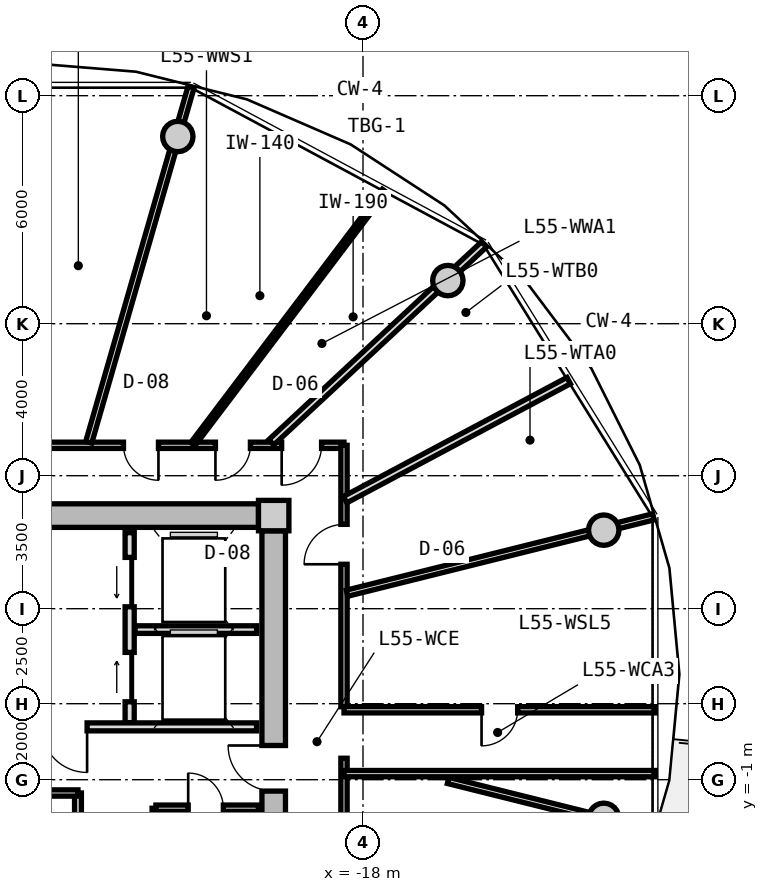
"""IFC4 building model, lengths in metres.
Left out: names, types, materials, properties, quantities, classifications, styles, units other than length and angle.
Written with IfcOpenShell. Run it as: python <this file> out.ifc"""

import sys

from ifc_helpers import new_model, si_unit, direction, frame, frame_2d, origin, origin_2d, place, context, subcontext, project, spatial, rectangle, circle, extrude, source, transform, mapped, element, fill, save


model = new_model("IFC4")
c1 = context("Model", 3, precision=1e-05, world=origin(), true_north=direction((0.0, 1.0)))
c2 = subcontext(c1, "Body", "Model", "MODEL_VIEW")
j1 = project(units=[si_unit("LENGTHUNIT", "METRE"), si_unit("PLANEANGLEUNIT", "RADIAN")], contexts=[c1])
p1 = place(None, origin())
s1 = spatial("IfcSite", under=j1, at=p1, CompositionType="ELEMENT")
p2 = place(p1, origin())
s2 = spatial("IfcBuilding", under=s1, at=p2, CompositionType="ELEMENT")
p3 = place(p2, frame((0.0, 0.0, 177.0)))
s3 = spatial("IfcBuildingStorey", under=s2, at=p3, CompositionType="ELEMENT", Elevation=177.0)
m1 = source(origin(), c2, "Body", "SweptSolid", [
    extrude(rectangle(XDim=0.8, YDim=0.8, at=origin_2d()), origin(), (0.0, 0.0, 1.0), 3.05),
])
p4 = place(p3, frame((-20.35, 5.95, 0.0), z_axis=(0.0, 0.0, 1.0), x_axis=(1.0, 0.0, 0.0)))
e1 = element("IfcColumn", 1, at=p4, inside=s3, PredefinedType="COLUMN", context=c2, shape_type="MappedRepresentation", body=[
    mapped(m1, transform((0.0, 0.0, 0.0), x_axis=(1.0, 0.0, 0.0), y_axis=(0.0, 1.0, 0.0), z_axis=(0.0, 0.0, 1.0), scale=1.0)),
])
m2 = source(origin(), c2, "Body", "SweptSolid", [
    extrude(rectangle(XDim=14.5, YDim=0.62, at=frame_2d((7.25, 0.0))), origin(), (0.0, 0.0, 1.0), 2.81),
])
p5 = place(p3, frame((-35.25, 5.95, 0.0), z_axis=(0.0, 0.0, 1.0), x_axis=(1.0, 0.0, 0.0)))
e2 = element("IfcWall", 2, at=p5, inside=s3, PredefinedType="SHEAR", context=c2, shape_type="MappedRepresentation", body=[
    mapped(m2, transform((0.0, 0.0, 0.0), x_axis=(1.0, 0.0, 0.0), y_axis=(0.0, 1.0, 0.0), z_axis=(0.0, 0.0, 1.0), scale=1.0)),
])
m3 = source(origin(), c2, "Body", "SweptSolid", [
    extrude(rectangle(XDim=11.1, YDim=0.62, at=frame_2d((5.55, 0.0))), origin(), (0.0, 0.0, 1.0), 2.81),
])
p6 = place(p3, frame((-20.35, 5.55, 0.0), z_axis=(0.0, 0.0, 1.0), x_axis=(0.0, -1.0, 0.0)))
e3 = element("IfcWall", 3, at=p6, inside=s3, PredefinedType="SHEAR", context=c2, shape_type="MappedRepresentation", body=[
    mapped(m3, transform((0.0, 0.0, 0.0), x_axis=(1.0, 0.0, 0.0), y_axis=(0.0, 1.0, 0.0), z_axis=(0.0, 0.0, 1.0), scale=1.0)),
])
p7 = place(p6, frame((5.65, 0.0, 0.0)))
e4 = element("IfcOpeningElement", 4, at=p7, cuts=e3, PredefinedType="OPENING", context=c2, shape_type="SweptSolid", body=[
    extrude(rectangle(XDim=1.2, YDim=2.15, at=frame_2d((0.6, 1.075))), frame((0.0, 0.32, 0.0), z_axis=(0.0, -1.0, 0.0), x_axis=(1.0, 0.0, 0.0)), (0.0, 0.0, 1.0), 0.64),
])
m4 = source(origin(), c2, "Body", "SweptSolid", [
    extrude(circle(Radius=0.4, at=origin_2d()), origin(), (0.0, 0.0, 1.0), 3.05),
])
for number, where, z_axis, x_axis in (
    (5, (-11.665, 5.567, 0.0), (0.0, 0.0, 1.0), (1.0, 0.0, 0.0)),
    (6, (-15.767, 12.135, 0.0), (0.0, 0.0, 1.0), (1.0, 0.0, 0.0)),
    (7, (-22.873, 15.926, 0.0), (0.0, 0.0, 1.0), (1.0, 0.0, 0.0)),
    (8, (-11.665, -2.016, 0.0), (0.0, 0.0, 1.0), (1.0, 0.0, 0.0)),
):
    element("IfcColumn", number, at=place(p3, frame(where, z_axis=z_axis, x_axis=x_axis)), inside=s3, PredefinedType="COLUMN", context=c2, shape_type="MappedRepresentation", body=[
        mapped(m4, transform((0.0, 0.0, 0.0), x_axis=(1.0, 0.0, 0.0), y_axis=(0.0, 1.0, 0.0), z_axis=(0.0, 0.0, 1.0), scale=1.0)),
    ])
m5 = source(origin(), c2, "Body", "SweptSolid", [
    extrude(rectangle(XDim=5.0, YDim=0.24, at=frame_2d((2.5, 0.0))), origin(), (0.0, 0.0, 1.0), 2.795),
])
p8 = place(p3, frame((-24.14, 0.5, 0.0), z_axis=(0.0, 0.0, 1.0), x_axis=(0.0, 1.0, 0.0)))
e9 = element("IfcWall", 9, at=p8, inside=s3, PredefinedType="PARTITIONING", context=c2, shape_type="MappedRepresentation", body=[
    mapped(m5, transform((0.0, 0.0, 0.0), x_axis=(1.0, 0.0, 0.0), y_axis=(0.0, 1.0, 0.0), z_axis=(0.0, 0.0, 1.0), scale=1.0)),
])
p9 = place(p8, frame((3.05, 0.0, 0.0)))
e10 = element("IfcOpeningElement", 10, at=p9, cuts=e9, PredefinedType="OPENING", context=c2, shape_type="SweptSolid", body=[
    extrude(rectangle(XDim=1.3, YDim=2.2, at=frame_2d((0.65, 1.1))), frame((0.0, 0.13, 0.0), z_axis=(0.0, -1.0, 0.0), x_axis=(1.0, 0.0, 0.0)), (0.0, 0.0, 1.0), 0.26),
])
p10 = place(p8, frame((0.55, 0.0, 0.0)))
e11 = element("IfcOpeningElement", 11, at=p10, cuts=e9, PredefinedType="OPENING", context=c2, shape_type="SweptSolid", body=[
    extrude(rectangle(XDim=1.3, YDim=2.2, at=frame_2d((0.65, 1.1))), frame((0.0, 0.13, 0.0), z_axis=(0.0, -1.0, 0.0), x_axis=(1.0, 0.0, 0.0)), (0.0, 0.0, 1.0), 0.26),
])
m6 = source(origin(), c2, "Body", "SweptSolid", [
    extrude(rectangle(XDim=3.2, YDim=0.2, at=frame_2d((1.6, 0.0))), origin(), (0.0, 0.0, 1.0), 2.795),
])
p11 = place(p3, frame((-24.0, 2.95, 0.0), z_axis=(0.0, 0.0, 1.0), x_axis=(1.0, 0.0, 0.0)))
e12 = element("IfcWall", 12, at=p11, inside=s3, PredefinedType="PARTITIONING", context=c2, shape_type="MappedRepresentation", body=[
    mapped(m6, transform((0.0, 0.0, 0.0), x_axis=(1.0, 0.0, 0.0), y_axis=(0.0, 1.0, 0.0), z_axis=(0.0, 0.0, 1.0), scale=1.0)),
])
m7 = source(origin(), c2, "Body", "SweptSolid", [
    extrude(rectangle(XDim=6.66, YDim=0.21, at=frame_2d((3.33, 0.0))), origin(), (0.0, 0.0, 1.0), 2.795),
])
p12 = place(p3, frame((-27.46, 0.39, 0.0), z_axis=(0.0, 0.0, 1.0), x_axis=(1.0, 0.0, 0.0)))
e13 = element("IfcWall", 13, at=p12, inside=s3, PredefinedType="PARTITIONING", context=c2, shape_type="MappedRepresentation", body=[
    mapped(m7, transform((0.0, 0.0, 0.0), x_axis=(1.0, 0.0, 0.0), y_axis=(0.0, 1.0, 0.0), z_axis=(0.0, 0.0, 1.0), scale=1.0)),
])
p13 = place(p12, frame((1.0, 0.0, 0.0)))
e14 = element("IfcOpeningElement", 14, at=p13, cuts=e13, PredefinedType="OPENING", context=c2, shape_type="SweptSolid", body=[
    extrude(rectangle(XDim=1.2, YDim=2.15, at=frame_2d((0.6, 1.075))), frame((0.0, 0.115, 0.0), z_axis=(0.0, -1.0, 0.0), x_axis=(1.0, 0.0, 0.0)), (0.0, 0.0, 1.0), 0.23),
])
m8 = source(origin(), c2, "Body", "SweptSolid", [
    extrude(rectangle(XDim=3.8, YDim=0.2, at=frame_2d((1.9, 0.0))), origin(), (0.0, 0.0, 1.0), 2.795),
])
p14 = place(p3, frame((-23.45, -5.55, 0.0), z_axis=(0.0, 0.0, 1.0), x_axis=(0.0, 1.0, 0.0)))
e15 = element("IfcWall", 15, at=p14, inside=s3, PredefinedType="PARTITIONING", context=c2, shape_type="MappedRepresentation", body=[
    mapped(m8, transform((0.0, 0.0, 0.0), x_axis=(1.0, 0.0, 0.0), y_axis=(0.0, 1.0, 0.0), z_axis=(0.0, 0.0, 1.0), scale=1.0)),
])
m9 = source(origin(), c2, "Body", "SweptSolid", [
    extrude(rectangle(XDim=4.2, YDim=0.18, at=frame_2d((2.1, 0.0))), origin(), (0.0, 0.0, 1.0), 2.795),
])
p15 = place(p3, frame((-25.5, -5.55, 0.0), z_axis=(0.0, 0.0, 1.0), x_axis=(0.0, 1.0, 0.0)))
e16 = element("IfcWall", 16, at=p15, inside=s3, PredefinedType="PARTITIONING", context=c2, shape_type="MappedRepresentation", body=[
    mapped(m9, transform((0.0, 0.0, 0.0), x_axis=(1.0, 0.0, 0.0), y_axis=(0.0, 1.0, 0.0), z_axis=(0.0, 0.0, 1.0), scale=1.0)),
])
m10 = source(origin(), c2, "Body", "SweptSolid", [
    extrude(rectangle(XDim=4.77, YDim=0.165, at=frame_2d((2.385, 0.0))), origin(), (0.0, 0.0, 1.0), 2.795),
])
p16 = place(p3, frame((-30.27, -1.35, 0.0), z_axis=(0.0, 0.0, 1.0), x_axis=(1.0, 0.0, 0.0)))
e17 = element("IfcWall", 17, at=p16, inside=s3, PredefinedType="PARTITIONING", context=c2, shape_type="MappedRepresentation", body=[
    mapped(m10, transform((0.0, 0.0, 0.0), x_axis=(1.0, 0.0, 0.0), y_axis=(0.0, 1.0, 0.0), z_axis=(0.0, 0.0, 1.0), scale=1.0)),
])
p17 = place(p16, frame((1.85, 0.0, 0.0)))
e18 = element("IfcOpeningElement", 18, at=p17, cuts=e17, PredefinedType="OPENING", context=c2, shape_type="SweptSolid", body=[
    extrude(rectangle(XDim=1.0, YDim=2.1, at=frame_2d((0.5, 1.05))), frame((0.0, 0.093, 0.0), z_axis=(0.0, -1.0, 0.0), x_axis=(1.0, 0.0, 0.0)), (0.0, 0.0, 1.0), 0.185),
])
m11 = source(origin(), c2, "Body", "SweptSolid", [
    extrude(rectangle(XDim=2.7, YDim=0.165, at=frame_2d((1.35, 0.0))), origin(), (0.0, 0.0, 1.0), 2.795),
])
p18 = place(p3, frame((-23.45, -1.75, 0.0), z_axis=(0.0, 0.0, 1.0), x_axis=(1.0, 0.0, 0.0)))
e19 = element("IfcWall", 19, at=p18, inside=s3, PredefinedType="PARTITIONING", context=c2, shape_type="MappedRepresentation", body=[
    mapped(m11, transform((0.0, 0.0, 0.0), x_axis=(1.0, 0.0, 0.0), y_axis=(0.0, 1.0, 0.0), z_axis=(0.0, 0.0, 1.0), scale=1.0)),
])
p19 = place(p18, frame((0.85, 0.0, 0.0)))
e20 = element("IfcOpeningElement", 20, at=p19, cuts=e19, PredefinedType="OPENING", context=c2, shape_type="SweptSolid", body=[
    extrude(rectangle(XDim=0.925, YDim=2.1, at=frame_2d((0.462, 1.05))), frame((0.0, 0.093, 0.0), z_axis=(0.0, -1.0, 0.0), x_axis=(1.0, 0.0, 0.0)), (0.0, 0.0, 1.0), 0.185),
])
m12 = source(origin(), c2, "Body", "SweptSolid", [
    extrude(rectangle(XDim=8.58, YDim=0.165, at=frame_2d((4.29, 0.0))), origin(), (0.0, 0.0, 1.0), 2.795),
])
p20 = place(p3, frame((-27.08, 7.8, 0.0), z_axis=(0.0, 0.0, 1.0), x_axis=(1.0, 0.0, 0.0)))
e21 = element("IfcWall", 21, at=p20, inside=s3, PredefinedType="PARTITIONING", context=c2, shape_type="MappedRepresentation", body=[
    mapped(m12, transform((0.0, 0.0, 0.0), x_axis=(1.0, 0.0, 0.0), y_axis=(0.0, 1.0, 0.0), z_axis=(0.0, 0.0, 1.0), scale=1.0)),
])
p21 = place(p20, frame((6.94, 0.0, 0.0)))
e22 = element("IfcOpeningElement", 22, at=p21, cuts=e21, PredefinedType="OPENING", context=c2, shape_type="SweptSolid", body=[
    extrude(rectangle(XDim=1.05, YDim=2.15, at=frame_2d((0.525, 1.075))), frame((0.0, 0.093, 0.0), z_axis=(0.0, -1.0, 0.0), x_axis=(1.0, 0.0, 0.0)), (0.0, 0.0, 1.0), 0.185),
])
p22 = place(p20, frame((5.197, 0.0, 0.0)))
e23 = element("IfcOpeningElement", 23, at=p22, cuts=e21, PredefinedType="OPENING", context=c2, shape_type="SweptSolid", body=[
    extrude(rectangle(XDim=0.92, YDim=2.1, at=frame_2d((0.46, 1.05))), frame((0.0, 0.093, 0.0), z_axis=(0.0, -1.0, 0.0), x_axis=(1.0, 0.0, 0.0)), (0.0, 0.0, 1.0), 0.185),
])
p23 = place(p20, frame((2.778, 0.0, 0.0)))
e24 = element("IfcOpeningElement", 24, at=p23, cuts=e21, PredefinedType="OPENING", context=c2, shape_type="SweptSolid", body=[
    extrude(rectangle(XDim=0.92, YDim=2.1, at=frame_2d((0.46, 1.05))), frame((0.0, 0.093, 0.0), z_axis=(0.0, -1.0, 0.0), x_axis=(1.0, 0.0, 0.0)), (0.0, 0.0, 1.0), 0.185),
])
m13 = source(origin(), c2, "Body", "SweptSolid", [
    extrude(rectangle(XDim=6.88, YDim=0.165, at=frame_2d((3.44, 0.0))), origin(), (0.0, 0.0, 1.0), 2.795),
])
p24 = place(p3, frame((-18.5, 7.8, 0.0), z_axis=(0.0, 0.0, 1.0), x_axis=(0.0, -1.0, 0.0)))
e25 = element("IfcWall", 25, at=p24, inside=s3, PredefinedType="PARTITIONING", context=c2, shape_type="MappedRepresentation", body=[
    mapped(m13, transform((0.0, 0.0, 0.0), x_axis=(1.0, 0.0, 0.0), y_axis=(0.0, 1.0, 0.0), z_axis=(0.0, 0.0, 1.0), scale=1.0)),
])
p25 = place(p24, frame((2.081, 0.0, 0.0)))
e26 = element("IfcOpeningElement", 26, at=p25, cuts=e25, PredefinedType="OPENING", context=c2, shape_type="SweptSolid", body=[
    extrude(rectangle(XDim=1.05, YDim=2.15, at=frame_2d((0.525, 1.075))), frame((0.0, 0.093, 0.0), z_axis=(0.0, -1.0, 0.0), x_axis=(1.0, 0.0, 0.0)), (0.0, 0.0, 1.0), 0.185),
])
m14 = source(origin(), c2, "Body", "SweptSolid", [
    extrude(rectangle(XDim=7.365, YDim=0.165, at=frame_2d((3.682, 0.0))), origin(), (0.0, 0.0, 1.0), 2.795),
])
p26 = place(p3, frame((-18.5, -0.436, 0.0), z_axis=(0.0, 0.0, 1.0), x_axis=(0.0, -1.0, 0.0)))
e27 = element("IfcWall", 27, at=p26, inside=s3, PredefinedType="PARTITIONING", context=c2, shape_type="MappedRepresentation", body=[
    mapped(m14, transform((0.0, 0.0, 0.0), x_axis=(1.0, 0.0, 0.0), y_axis=(0.0, 1.0, 0.0), z_axis=(0.0, 0.0, 1.0), scale=1.0)),
])
p27 = place(p26, frame((2.433, 0.0, 0.0)))
e28 = element("IfcOpeningElement", 28, at=p27, cuts=e27, PredefinedType="OPENING", context=c2, shape_type="SweptSolid", body=[
    extrude(rectangle(XDim=1.25, YDim=2.2, at=frame_2d((0.625, 1.1))), frame((0.0, 0.093, 0.0), z_axis=(0.0, -1.0, 0.0), x_axis=(1.0, 0.0, 0.0)), (0.0, 0.0, 1.0), 0.185),
])
m15 = source(origin(), c2, "Body", "SweptSolid", [
    extrude(rectangle(XDim=9.73, YDim=0.165, at=frame_2d((4.865, 0.0))), origin(), (0.0, 0.0, 1.0), 2.345),
])
p28 = place(p3, frame((-25.217, 7.88, 0.0), z_axis=(0.0, 0.0, 1.0), x_axis=(0.27679492614, 0.960929013436, 0.0)))
e29 = element("IfcWall", 29, at=p28, inside=s3, PredefinedType="PARTITIONING", context=c2, shape_type="MappedRepresentation", body=[
    mapped(m15, transform((0.0, 0.0, 0.0), x_axis=(1.0, 0.0, 0.0), y_axis=(0.0, 1.0, 0.0), z_axis=(0.0, 0.0, 1.0), scale=1.0)),
])
m16 = source(origin(), c2, "Body", "SweptSolid", [
    extrude(rectangle(XDim=5.564, YDim=0.165, at=frame_2d((2.782, 0.0))), origin(), (0.0, 0.0, 1.0), 2.345),
])
p29 = place(p3, frame((-15.76, -1.02, 0.0), z_axis=(0.0, 0.0, 1.0), x_axis=(0.970315176167, -0.241843872984, 0.0)))
e30 = element("IfcWall", 30, at=p29, inside=s3, PredefinedType="PARTITIONING", context=c2, shape_type="MappedRepresentation", body=[
    mapped(m16, transform((0.0, 0.0, 0.0), x_axis=(1.0, 0.0, 0.0), y_axis=(0.0, 1.0, 0.0), z_axis=(0.0, 0.0, 1.0), scale=1.0)),
])
m17 = source(origin(), c2, "Body", "SweptSolid", [
    extrude(rectangle(XDim=8.305, YDim=0.165, at=frame_2d((4.153, 0.0))), origin(), (0.0, 0.0, 1.0), 2.345),
])
p30 = place(p3, frame((-18.42, 3.908, 0.0), z_axis=(0.0, 0.0, 1.0), x_axis=(0.970309994378, 0.241864662175, 0.0)))
e31 = element("IfcWall", 31, at=p30, inside=s3, PredefinedType="PARTITIONING", context=c2, shape_type="MappedRepresentation", body=[
    mapped(m17, transform((0.0, 0.0, 0.0), x_axis=(1.0, 0.0, 0.0), y_axis=(0.0, 1.0, 0.0), z_axis=(0.0, 0.0, 1.0), scale=1.0)),
])
m18 = source(origin(), c2, "Body", "SweptSolid", [
    extrude(rectangle(XDim=8.189, YDim=0.165, at=frame_2d((4.094, 0.0))), origin(), (0.0, 0.0, 1.0), 2.795),
])
p31 = place(p3, frame((-18.5, 0.84, 0.0), z_axis=(0.0, 0.0, 1.0), x_axis=(1.0, 0.0, 0.0)))
e32 = element("IfcWall", 32, at=p31, inside=s3, PredefinedType="PARTITIONING", context=c2, shape_type="MappedRepresentation", body=[
    mapped(m18, transform((0.0, 0.0, 0.0), x_axis=(1.0, 0.0, 0.0), y_axis=(0.0, 1.0, 0.0), z_axis=(0.0, 0.0, 1.0), scale=1.0)),
])
p32 = place(p31, frame((3.619, 0.0, 0.0)))
e33 = element("IfcOpeningElement", 33, at=p32, cuts=e32, PredefinedType="OPENING", context=c2, shape_type="SweptSolid", body=[
    extrude(rectangle(XDim=0.95, YDim=2.1, at=frame_2d((0.475, 1.05))), frame((0.0, 0.093, 0.0), z_axis=(0.0, -1.0, 0.0), x_axis=(1.0, 0.0, 0.0)), (0.0, 0.0, 1.0), 0.185),
])
p33 = place(p3, frame((-10.311, -0.84, 0.0), z_axis=(0.0, 0.0, 1.0), x_axis=(-1.0, 0.0, 0.0)))
e34 = element("IfcWall", 34, at=p33, inside=s3, PredefinedType="PARTITIONING", context=c2, shape_type="MappedRepresentation", body=[
    mapped(m18, transform((0.0, 0.0, 0.0), x_axis=(1.0, 0.0, 0.0), y_axis=(0.0, 1.0, 0.0), z_axis=(0.0, 0.0, 1.0), scale=1.0)),
])
m19 = source(origin(), c2, "Body", "SweptSolid", [
    extrude(rectangle(XDim=7.648, YDim=0.19, at=frame_2d((3.824, 0.0))), origin(), (0.0, 0.0, 1.0), 2.345),
])
p34 = place(p3, frame((-20.413, 7.88, 0.0), z_axis=(0.0, 0.0, 1.0), x_axis=(0.732182665826, 0.681108320213, 0.0)))
e35 = element("IfcWall", 35, at=p34, inside=s3, PredefinedType="PARTITIONING", context=c2, shape_type="MappedRepresentation", body=[
    mapped(m19, transform((0.0, 0.0, 0.0), x_axis=(1.0, 0.0, 0.0), y_axis=(0.0, 1.0, 0.0), z_axis=(0.0, 0.0, 1.0), scale=1.0)),
])
m20 = source(origin(), c2, "Body", "SweptSolid", [
    extrude(rectangle(XDim=6.665, YDim=0.19, at=frame_2d((3.333, 0.0))), origin(), (0.0, 0.0, 1.0), 2.795),
])
p35 = place(p3, frame((-18.47, 6.37, 0.0), z_axis=(0.0, 0.0, 1.0), x_axis=(0.88263769619, 0.470053930166, 0.0)))
e36 = element("IfcWall", 36, at=p35, inside=s3, PredefinedType="PARTITIONING", context=c2, shape_type="MappedRepresentation", body=[
    mapped(m20, transform((0.0, 0.0, 0.0), x_axis=(1.0, 0.0, 0.0), y_axis=(0.0, 1.0, 0.0), z_axis=(0.0, 0.0, 1.0), scale=1.0)),
])
m21 = source(origin(), c2, "Body", "SweptSolid", [
    extrude(rectangle(XDim=8.359, YDim=0.14, at=frame_2d((4.18, 0.0))), origin(), (0.0, 0.0, 1.0), 2.795),
])
p36 = place(p3, frame((-22.477, 7.83, 0.0), z_axis=(0.0, 0.0, 1.0), x_axis=(0.603265985309, 0.797540062297, 0.0)))
e37 = element("IfcWall", 37, at=p36, inside=s3, PredefinedType="PARTITIONING", context=c2, shape_type="MappedRepresentation", body=[
    mapped(m21, transform((0.0, 0.0, 0.0), x_axis=(1.0, 0.0, 0.0), y_axis=(0.0, 1.0, 0.0), z_axis=(0.0, 0.0, 1.0), scale=1.0)),
])
m22 = source(origin(), c2, "Body", "SweptSolid", [
    extrude(rectangle(XDim=1.3, YDim=2.2, at=frame_2d((0.65, 1.1))), frame((0.0, 0.025, 0.0), z_axis=(0.0, -1.0, 0.0), x_axis=(1.0, 0.0, 0.0)), (0.0, 0.0, 1.0), 0.05),
])
p37 = place(p9, origin())
e38 = element("IfcDoor", 38, at=p37, inside=s3, OperationType="SLIDING_TO_LEFT", PredefinedType="DOOR", context=c2, shape_type="MappedRepresentation", body=[
    mapped(m22, transform((0.0, 0.0, 0.0), x_axis=(1.0, 0.0, 0.0), y_axis=(0.0, 1.0, 0.0), z_axis=(0.0, 0.0, 1.0), scale=1.0)),
])
fill(e10, e38)
p38 = place(p10, origin())
e39 = element("IfcDoor", 39, at=p38, inside=s3, OperationType="SLIDING_TO_RIGHT", PredefinedType="DOOR", context=c2, shape_type="MappedRepresentation", body=[
    mapped(m22, transform((0.0, 0.0, 0.0), x_axis=(1.0, 0.0, 0.0), y_axis=(0.0, 1.0, 0.0), z_axis=(0.0, 0.0, 1.0), scale=1.0)),
])
fill(e11, e39)
m23 = source(origin(), c2, "Body", "SweptSolid", [
    extrude(rectangle(XDim=1.2, YDim=2.15, at=frame_2d((0.6, 1.075))), frame((0.0, 0.025, 0.0), z_axis=(0.0, -1.0, 0.0), x_axis=(1.0, 0.0, 0.0)), (0.0, 0.0, 1.0), 0.05),
])
p39 = place(p13, frame((1.2, 0.0, 0.0), z_axis=(0.0, 0.0, 1.0), x_axis=(-1.0, 0.0, 0.0)))
e40 = element("IfcDoor", 40, at=p39, inside=s3, OperationType="SINGLE_SWING_LEFT", PredefinedType="DOOR", context=c2, shape_type="MappedRepresentation", body=[
    mapped(m23, transform((0.0, 0.0, 0.0), x_axis=(1.0, 0.0, 0.0), y_axis=(0.0, 1.0, 0.0), z_axis=(0.0, 0.0, 1.0), scale=1.0)),
])
fill(e14, e40)
p40 = place(p7, frame((1.2, 0.0, 0.0), z_axis=(0.0, 0.0, 1.0), x_axis=(-1.0, 0.0, 0.0)))
e41 = element("IfcDoor", 41, at=p40, inside=s3, OperationType="SINGLE_SWING_RIGHT", PredefinedType="DOOR", context=c2, shape_type="MappedRepresentation", body=[
    mapped(m23, transform((0.0, 0.0, 0.0), x_axis=(1.0, 0.0, 0.0), y_axis=(0.0, 1.0, 0.0), z_axis=(0.0, 0.0, 1.0), scale=1.0)),
])
fill(e4, e41)
m24 = source(origin(), c2, "Body", "SweptSolid", [
    extrude(rectangle(XDim=0.925, YDim=2.1, at=frame_2d((0.462, 1.05))), frame((0.0, 0.025, 0.0), z_axis=(0.0, -1.0, 0.0), x_axis=(1.0, 0.0, 0.0)), (0.0, 0.0, 1.0), 0.05),
])
p41 = place(p19, origin())
e42 = element("IfcDoor", 42, at=p41, inside=s3, OperationType="SINGLE_SWING_LEFT", PredefinedType="DOOR", context=c2, shape_type="MappedRepresentation", body=[
    mapped(m24, transform((0.0, 0.0, 0.0), x_axis=(1.0, 0.0, 0.0), y_axis=(0.0, 1.0, 0.0), z_axis=(0.0, 0.0, 1.0), scale=1.0)),
])
fill(e20, e42)
m25 = source(origin(), c2, "Body", "SweptSolid", [
    extrude(rectangle(XDim=0.95, YDim=2.1, at=frame_2d((0.475, 1.05))), frame((0.0, 0.025, 0.0), z_axis=(0.0, -1.0, 0.0), x_axis=(1.0, 0.0, 0.0)), (0.0, 0.0, 1.0), 0.05),
])
p42 = place(p32, frame((0.95, 0.0, 0.0), z_axis=(0.0, 0.0, 1.0), x_axis=(-1.0, 0.0, 0.0)))
e43 = element("IfcDoor", 43, at=p42, inside=s3, OperationType="SINGLE_SWING_RIGHT", PredefinedType="DOOR", context=c2, shape_type="MappedRepresentation", body=[
    mapped(m25, transform((0.0, 0.0, 0.0), x_axis=(1.0, 0.0, 0.0), y_axis=(0.0, 1.0, 0.0), z_axis=(0.0, 0.0, 1.0), scale=1.0)),
])
fill(e33, e43)
m26 = source(origin(), c2, "Body", "SweptSolid", [
    extrude(rectangle(XDim=1.05, YDim=2.15, at=frame_2d((0.525, 1.075))), frame((0.0, 0.025, 0.0), z_axis=(0.0, -1.0, 0.0), x_axis=(1.0, 0.0, 0.0)), (0.0, 0.0, 1.0), 0.05),
])
p43 = place(p25, frame((1.05, 0.0, 0.0), z_axis=(0.0, 0.0, 1.0), x_axis=(-1.0, 0.0, 0.0)))
e44 = element("IfcDoor", 44, at=p43, inside=s3, OperationType="SINGLE_SWING_LEFT", PredefinedType="DOOR", context=c2, shape_type="MappedRepresentation", body=[
    mapped(m26, transform((0.0, 0.0, 0.0), x_axis=(1.0, 0.0, 0.0), y_axis=(0.0, 1.0, 0.0), z_axis=(0.0, 0.0, 1.0), scale=1.0)),
])
fill(e26, e44)
p44 = place(p21, frame((1.05, 0.0, 0.0), z_axis=(0.0, 0.0, 1.0), x_axis=(-1.0, 0.0, 0.0)))
e45 = element("IfcDoor", 45, at=p44, inside=s3, OperationType="SINGLE_SWING_RIGHT", PredefinedType="DOOR", context=c2, shape_type="MappedRepresentation", body=[
    mapped(m26, transform((0.0, 0.0, 0.0), x_axis=(1.0, 0.0, 0.0), y_axis=(0.0, 1.0, 0.0), z_axis=(0.0, 0.0, 1.0), scale=1.0)),
])
fill(e22, e45)
m27 = source(origin(), c2, "Body", "SweptSolid", [
    extrude(rectangle(XDim=0.92, YDim=2.1, at=frame_2d((0.46, 1.05))), frame((0.0, 0.025, 0.0), z_axis=(0.0, -1.0, 0.0), x_axis=(1.0, 0.0, 0.0)), (0.0, 0.0, 1.0), 0.05),
])
p45 = place(p22, frame((0.92, 0.0, 0.0), z_axis=(0.0, 0.0, 1.0), x_axis=(-1.0, 0.0, 0.0)))
e46 = element("IfcDoor", 46, at=p45, inside=s3, OperationType="SINGLE_SWING_RIGHT", PredefinedType="DOOR", context=c2, shape_type="MappedRepresentation", body=[
    mapped(m27, transform((0.0, 0.0, 0.0), x_axis=(1.0, 0.0, 0.0), y_axis=(0.0, 1.0, 0.0), z_axis=(0.0, 0.0, 1.0), scale=1.0)),
])
fill(e23, e46)
p46 = place(p23, frame((0.92, 0.0, 0.0), z_axis=(0.0, 0.0, 1.0), x_axis=(-1.0, 0.0, 0.0)))
e47 = element("IfcDoor", 47, at=p46, inside=s3, OperationType="SINGLE_SWING_LEFT", PredefinedType="DOOR", context=c2, shape_type="MappedRepresentation", body=[
    mapped(m27, transform((0.0, 0.0, 0.0), x_axis=(1.0, 0.0, 0.0), y_axis=(0.0, 1.0, 0.0), z_axis=(0.0, 0.0, 1.0), scale=1.0)),
])
fill(e24, e47)
save(model, sys.argv[1])
